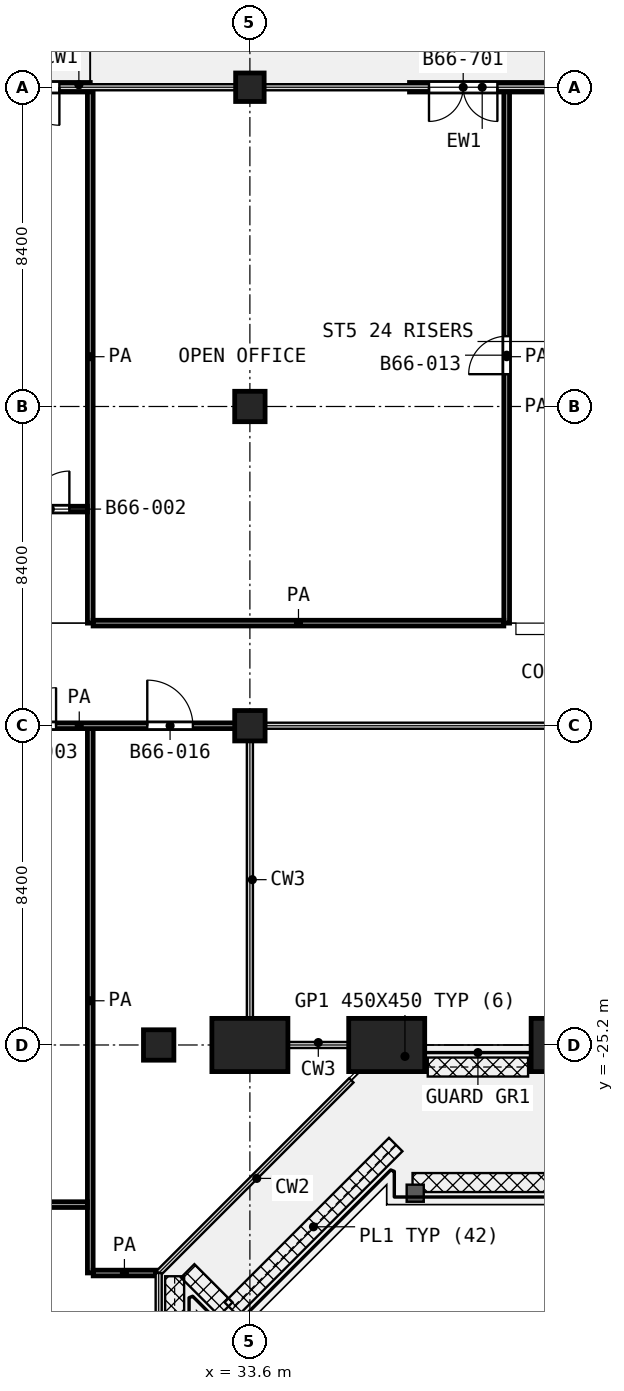
"""IFC4 building model, lengths in metres.
Left out: names, types, materials, properties, quantities, classifications, styles, units other than length and angle.
Written with IfcOpenShell. Run it as: python <this file> out.ifc"""

import sys

from ifc_helpers import new_model, si_unit, direction, frame, frame_2d, origin, origin_2d, place, context, subcontext, project, spatial, rectangle, extrude, element, fill, save


model = new_model("IFC4")
c1 = context("Model", 3, precision=1e-05, world=origin(), true_north=direction((0.0, 1.0)))
c2 = subcontext(c1, "Body", "Model", "MODEL_VIEW")
j1 = project(units=[si_unit("LENGTHUNIT", "METRE"), si_unit("PLANEANGLEUNIT", "RADIAN")], contexts=[c1])
p1 = place(None, origin())
s1 = spatial("IfcSite", under=j1, at=p1, CompositionType="ELEMENT")
p2 = place(p1, origin())
s2 = spatial("IfcBuilding", under=s1, at=p2, CompositionType="ELEMENT")
p3 = place(p2, frame((0.0, 0.0, 286.0)))
s3 = spatial("IfcBuildingStorey", under=s2, at=p3, CompositionType="ELEMENT", Elevation=286.0)
p4 = place(p3, frame((33.6, 0.0, 0.0), z_axis=(0.0, 0.0, 1.0), x_axis=(1.0, 0.0, 0.0)))
e1 = element("IfcColumn", 1, at=p4, inside=s3, PredefinedType="COLUMN", context=c2, shape_type="SweptSolid", body=[
    extrude(rectangle(XDim=0.75, YDim=0.75, at=origin_2d()), origin(), (0.0, 0.0, 1.0), 4.2),
])
for number, where, z_axis, x_axis in (
    (2, (33.6, -8.4, 0.0), (0.0, 0.0, 1.0), (1.0, 0.0, 0.0)),
    (3, (33.6, -16.8, 0.0), (0.0, 0.0, 1.0), (1.0, 0.0, 0.0)),
    (4, (31.2, -25.2, 0.0), (0.0, 0.0, 1.0), (1.0, 0.0, 0.0)),
):
    element("IfcColumn", number, at=place(p3, frame(where, z_axis=z_axis, x_axis=x_axis)), inside=s3, PredefinedType="COLUMN", context=c2, shape_type="SweptSolid", body=[
        extrude(rectangle(XDim=0.8, YDim=0.8, at=origin_2d()), origin(), (0.0, 0.0, 1.0), 4.2),
    ])
for number, where, z_axis, x_axis in (
    (5, (42.0, -25.2, 0.0), (0.0, 0.0, 1.0), (-1.0, 0.0, 0.0)),
    (6, (37.2, -25.2, 0.0), (0.0, 0.0, 1.0), (-1.0, 0.0, 0.0)),
    (7, (33.6, -25.2, 0.0), (0.0, 0.0, 1.0), (-1.0, 0.0, 0.0)),
):
    element("IfcColumn", number, at=place(p3, frame(where, z_axis=z_axis, x_axis=x_axis)), inside=s3, PredefinedType="COLUMN", context=c2, shape_type="SweptSolid", body=[
        extrude(rectangle(XDim=2.0, YDim=1.4, at=origin_2d()), origin(), (0.0, 0.0, 1.0), 4.2),
    ])
p5 = place(p3, frame((41.625, 0.0, 0.0), z_axis=(0.0, 0.0, 1.0), x_axis=(-1.0, 0.0, 0.0)))
e8 = element("IfcWall", 8, at=p5, inside=s3, PredefinedType="SOLIDWALL", context=c2, shape_type="SweptSolid", body=[
    extrude(rectangle(XDim=3.825, YDim=0.25, at=frame_2d((1.913, 0.0))), origin(), (0.0, 0.0, 1.0), 3.48),
])
p6 = place(p5, frame((1.512, 0.0, 0.0)))
e9 = element("IfcOpeningElement", 9, at=p6, cuts=e8, PredefinedType="OPENING", context=c2, shape_type="SweptSolid", body=[
    extrude(rectangle(XDim=1.8, YDim=2.1, at=frame_2d((0.9, 1.05))), frame((0.0, 0.135, 0.0), z_axis=(0.0, -1.0, 0.0), x_axis=(1.0, 0.0, 0.0)), (0.0, 0.0, 1.0), 0.27),
])
p7 = place(p3, frame((29.4, 0.0, 0.0), z_axis=(0.0, 0.0, 1.0), x_axis=(-1.0, 0.0, 0.0)))
e10 = element("IfcWall", 10, at=p7, inside=s3, PredefinedType="SOLIDWALL", context=c2, shape_type="SweptSolid", body=[
    extrude(rectangle(XDim=3.825, YDim=0.25, at=frame_2d((1.913, 0.0))), origin(), (0.0, 0.0, 1.0), 3.48),
])
p8 = place(p7, frame((0.812, 0.0, 0.0)))
e11 = element("IfcOpeningElement", 11, at=p8, cuts=e10, PredefinedType="OPENING", context=c2, shape_type="SweptSolid", body=[
    extrude(rectangle(XDim=1.0, YDim=2.1, at=frame_2d((0.5, 1.05))), frame((0.0, 0.135, 0.0), z_axis=(0.0, -1.0, 0.0), x_axis=(1.0, 0.0, 0.0)), (0.0, 0.0, 1.0), 0.27),
])
p9 = place(p3, frame((29.477, -31.2, 0.0), z_axis=(0.0, 0.0, 1.0), x_axis=(1.0, 0.0, 0.0)))
e12 = element("IfcWall", 12, at=p9, inside=s3, PredefinedType="PARTITIONING", context=c2, shape_type="SweptSolid", body=[
    extrude(rectangle(XDim=1.643, YDim=0.15, at=frame_2d((0.822, 0.0))), origin(), (0.0, 0.0, 1.0), 3.6),
])
p10 = place(p3, frame((16.875, -29.4, 0.0), z_axis=(0.0, 0.0, 1.0), x_axis=(1.0, 0.0, 0.0)))
e13 = element("IfcWall", 13, at=p10, inside=s3, PredefinedType="PARTITIONING", context=c2, shape_type="SweptSolid", body=[
    extrude(rectangle(XDim=12.45, YDim=0.15, at=frame_2d((6.225, 0.0))), origin(), (0.0, 0.0, 1.0), 3.6),
])
p11 = place(p3, frame((24.7, -16.8, 0.0), z_axis=(0.0, 0.0, 1.0), x_axis=(1.0, 0.0, 0.0)))
e14 = element("IfcWall", 14, at=p11, inside=s3, PredefinedType="PARTITIONING", context=c2, shape_type="SweptSolid", body=[
    extrude(rectangle(XDim=8.82, YDim=0.15, at=frame_2d((4.41, 0.0))), origin(), (0.0, 0.0, 1.0), 3.6),
])
p12 = place(p11, frame((2.8, 0.0, 0.0)))
e15 = element("IfcOpeningElement", 15, at=p12, cuts=e14, PredefinedType="OPENING", context=c2, shape_type="SweptSolid", body=[
    extrude(rectangle(XDim=1.0, YDim=2.1, at=frame_2d((0.5, 1.05))), frame((0.0, 0.085, 0.0), z_axis=(0.0, -1.0, 0.0), x_axis=(1.0, 0.0, 0.0)), (0.0, 0.0, 1.0), 0.17),
])
p13 = place(p11, frame((1.4, 0.0, 0.0)))
e16 = element("IfcOpeningElement", 16, at=p13, cuts=e14, PredefinedType="OPENING", context=c2, shape_type="SweptSolid", body=[
    extrude(rectangle(XDim=1.0, YDim=2.1, at=frame_2d((0.5, 1.05))), frame((0.0, 0.085, 0.0), z_axis=(0.0, -1.0, 0.0), x_axis=(1.0, 0.0, 0.0)), (0.0, 0.0, 1.0), 0.17),
])
p14 = place(p11, frame((6.2, 0.0, 0.0)))
e17 = element("IfcOpeningElement", 17, at=p14, cuts=e14, PredefinedType="OPENING", context=c2, shape_type="SweptSolid", body=[
    extrude(rectangle(XDim=1.2, YDim=2.1, at=frame_2d((0.6, 1.05))), frame((0.0, 0.085, 0.0), z_axis=(0.0, -1.0, 0.0), x_axis=(1.0, 0.0, 0.0)), (0.0, 0.0, 1.0), 0.17),
])
p15 = place(p3, frame((29.475, -14.1, 0.0), z_axis=(0.0, 0.0, 1.0), x_axis=(1.0, 0.0, 0.0)))
e18 = element("IfcWall", 18, at=p15, inside=s3, PredefinedType="PARTITIONING", context=c2, shape_type="SweptSolid", body=[
    extrude(rectangle(XDim=10.807, YDim=0.15, at=frame_2d((5.403, 0.0))), origin(), (0.0, 0.0, 1.0), 3.6),
])
p16 = place(p3, frame((24.7, -11.1, 0.0), z_axis=(0.0, 0.0, 1.0), x_axis=(1.0, 0.0, 0.0)))
e19 = element("IfcWall", 19, at=p16, inside=s3, PredefinedType="PARTITIONING", context=c2, shape_type="SweptSolid", body=[
    extrude(rectangle(XDim=4.625, YDim=0.15, at=frame_2d((2.312, 0.0))), origin(), (0.0, 0.0, 1.0), 3.6),
])
p17 = place(p16, frame((1.1, 0.0, 0.0)))
e20 = element("IfcOpeningElement", 20, at=p17, cuts=e19, PredefinedType="OPENING", context=c2, shape_type="SweptSolid", body=[
    extrude(rectangle(XDim=0.9, YDim=2.1, at=frame_2d((0.45, 1.05))), frame((0.0, 0.085, 0.0), z_axis=(0.0, -1.0, 0.0), x_axis=(1.0, 0.0, 0.0)), (0.0, 0.0, 1.0), 0.17),
])
p18 = place(p16, frame((3.15, 0.0, 0.0)))
e21 = element("IfcOpeningElement", 21, at=p18, cuts=e19, PredefinedType="OPENING", context=c2, shape_type="SweptSolid", body=[
    extrude(rectangle(XDim=1.0, YDim=2.1, at=frame_2d((0.5, 1.05))), frame((0.0, 0.085, 0.0), z_axis=(0.0, -1.0, 0.0), x_axis=(1.0, 0.0, 0.0)), (0.0, 0.0, 1.0), 0.17),
])
p19 = place(p3, frame((29.4, -31.198, 0.0), z_axis=(0.0, 0.0, 1.0), x_axis=(0.0, 1.0, 0.0)))
e22 = element("IfcWall", 22, at=p19, inside=s3, PredefinedType="PARTITIONING", context=c2, shape_type="SweptSolid", body=[
    extrude(rectangle(XDim=14.323, YDim=0.15, at=frame_2d((7.162, 0.0))), origin(), (0.0, 0.0, 1.0), 3.6),
])
p20 = place(p3, frame((29.4, -14.1, 0.0), z_axis=(0.0, 0.0, 1.0), x_axis=(0.0, 1.0, 0.0)))
e23 = element("IfcWall", 23, at=p20, inside=s3, PredefinedType="PARTITIONING", context=c2, shape_type="SweptSolid", body=[
    extrude(rectangle(XDim=14.02, YDim=0.15, at=frame_2d((7.01, 0.0))), origin(), (0.0, 0.0, 1.0), 3.6),
])
p21 = place(p3, frame((40.357, -14.1, 0.0), z_axis=(0.0, 0.0, 1.0), x_axis=(0.0, 1.0, 0.0)))
e24 = element("IfcWall", 24, at=p21, inside=s3, PredefinedType="PARTITIONING", context=c2, shape_type="SweptSolid", body=[
    extrude(rectangle(XDim=14.02, YDim=0.15, at=frame_2d((7.01, 0.0))), origin(), (0.0, 0.0, 1.0), 3.6),
])
p22 = place(p21, frame((6.55, 0.0, 0.0)))
e25 = element("IfcOpeningElement", 25, at=p22, cuts=e24, PredefinedType="OPENING", context=c2, shape_type="SweptSolid", body=[
    extrude(rectangle(XDim=1.0, YDim=2.1, at=frame_2d((0.5, 1.05))), frame((0.0, 0.085, 0.0), z_axis=(0.0, -1.0, 0.0), x_axis=(1.0, 0.0, 0.0)), (0.0, 0.0, 1.0), 0.17),
])
p23 = place(p6, origin())
e26 = element("IfcDoor", 26, at=p23, inside=s3, OperationType="DOUBLE_DOOR_SINGLE_SWING", PredefinedType="DOOR", context=c2, shape_type="SweptSolid", body=[
    extrude(rectangle(XDim=1.8, YDim=2.1, at=frame_2d((0.9, 1.05))), frame((0.0, 0.025, 0.0), z_axis=(0.0, -1.0, 0.0), x_axis=(1.0, 0.0, 0.0)), (0.0, 0.0, 1.0), 0.05),
])
fill(e9, e26)
p24 = place(p8, origin())
e27 = element("IfcDoor", 27, at=p24, inside=s3, OperationType="SINGLE_SWING_LEFT", PredefinedType="DOOR", context=c2, shape_type="SweptSolid", body=[
    extrude(rectangle(XDim=1.0, YDim=2.1, at=frame_2d((0.5, 1.05))), frame((0.0, 0.025, 0.0), z_axis=(0.0, -1.0, 0.0), x_axis=(1.0, 0.0, 0.0)), (0.0, 0.0, 1.0), 0.05),
])
fill(e11, e27)
p25 = place(p12, origin())
e28 = element("IfcDoor", 28, at=p25, inside=s3, OperationType="SINGLE_SWING_RIGHT", PredefinedType="DOOR", context=c2, shape_type="SweptSolid", body=[
    extrude(rectangle(XDim=1.0, YDim=2.1, at=frame_2d((0.5, 1.05))), frame((0.0, 0.025, 0.0), z_axis=(0.0, -1.0, 0.0), x_axis=(1.0, 0.0, 0.0)), (0.0, 0.0, 1.0), 0.05),
])
fill(e15, e28)
p26 = place(p14, origin())
e29 = element("IfcDoor", 29, at=p26, inside=s3, OperationType="SINGLE_SWING_LEFT", PredefinedType="DOOR", context=c2, shape_type="SweptSolid", body=[
    extrude(rectangle(XDim=1.2, YDim=2.1, at=frame_2d((0.6, 1.05))), frame((0.0, 0.025, 0.0), z_axis=(0.0, -1.0, 0.0), x_axis=(1.0, 0.0, 0.0)), (0.0, 0.0, 1.0), 0.05),
])
fill(e17, e29)
p27 = place(p18, origin())
e30 = element("IfcDoor", 30, at=p27, inside=s3, OperationType="SINGLE_SWING_RIGHT", PredefinedType="DOOR", context=c2, shape_type="SweptSolid", body=[
    extrude(rectangle(XDim=1.0, YDim=2.1, at=frame_2d((0.5, 1.05))), frame((0.0, 0.025, 0.0), z_axis=(0.0, -1.0, 0.0), x_axis=(1.0, 0.0, 0.0)), (0.0, 0.0, 1.0), 0.05),
])
fill(e21, e30)
p28 = place(p22, origin())
e31 = element("IfcDoor", 31, at=p28, inside=s3, OperationType="SINGLE_SWING_LEFT", PredefinedType="DOOR", context=c2, shape_type="SweptSolid", body=[
    extrude(rectangle(XDim=1.0, YDim=2.1, at=frame_2d((0.5, 1.05))), frame((0.0, 0.025, 0.0), z_axis=(0.0, -1.0, 0.0), x_axis=(1.0, 0.0, 0.0)), (0.0, 0.0, 1.0), 0.05),
])
fill(e25, e31)
save(model, sys.argv[1])
